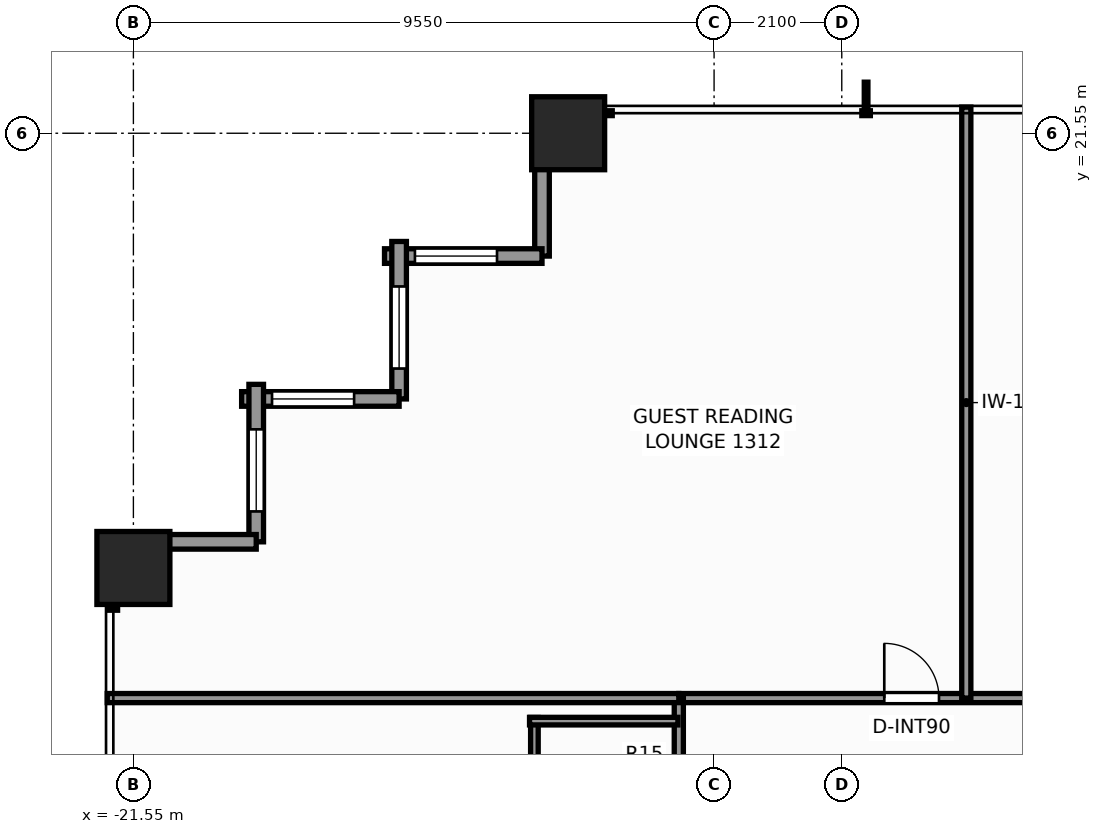
"""IFC4 building model, lengths in metres.
Left out: names, types, materials, properties, quantities, classifications, styles, units other than length and angle.
Written with IfcOpenShell. Run it as: python <this file> out.ifc"""

import sys

from ifc_helpers import new_model, si_unit, direction, frame, frame_2d, origin, origin_2d, place, context, subcontext, project, spatial, rectangle, extrude, element, fill, save


model = new_model("IFC4")
c1 = context("Model", 3, precision=1e-05, world=origin(), true_north=direction((0.0, 1.0)))
c2 = subcontext(c1, "Body", "Model", "MODEL_VIEW")
j1 = project(units=[si_unit("LENGTHUNIT", "METRE"), si_unit("PLANEANGLEUNIT", "RADIAN")], contexts=[c1])
p1 = place(None, origin())
s1 = spatial("IfcSite", under=j1, at=p1, CompositionType="ELEMENT")
p2 = place(p1, origin())
s2 = spatial("IfcBuilding", under=s1, at=p2, CompositionType="ELEMENT")
p3 = place(p2, frame((0.0, 0.0, 46.9)))
s3 = spatial("IfcBuildingStorey", under=s2, at=p3, CompositionType="ELEMENT", Elevation=46.9)
for number, where, z_axis, x_axis in (
    (1, (-14.4, 21.55, 0.0), (0.0, 0.0, 1.0), (1.0, 0.0, 0.0)),
    (2, (-21.55, 14.4, 0.0), (0.0, 0.0, 1.0), (1.0, 0.0, 0.0)),
):
    element("IfcColumn", number, at=place(p3, frame(where, z_axis=z_axis, x_axis=x_axis)), inside=s3, PredefinedType="COLUMN", context=c2, shape_type="SweptSolid", body=[
        extrude(rectangle(XDim=1.2, YDim=1.2, at=origin_2d()), origin(), (0.0, 0.0, 1.0), 3.3),
    ])
p4 = place(p3, frame((-14.83, 19.53, 0.0), z_axis=(0.0, 0.0, 1.0), x_axis=(0.0, 1.0, 0.0)))
e3 = element("IfcWall", 3, at=p4, inside=s3, PredefinedType="STANDARD", context=c2, shape_type="SweptSolid", body=[
    extrude(rectangle(XDim=2.59, YDim=0.24, at=frame_2d((1.295, 0.0))), origin(), (0.0, 0.0, 1.0), 2.439),
])
p5 = place(p3, frame((-17.42, 19.53, 0.0), z_axis=(0.0, 0.0, 1.0), x_axis=(1.0, 0.0, 0.0)))
e4 = element("IfcWall", 4, at=p5, inside=s3, PredefinedType="STANDARD", context=c2, shape_type="SweptSolid", body=[
    extrude(rectangle(XDim=2.59, YDim=0.24, at=frame_2d((1.295, 0.0))), origin(), (0.0, 0.0, 1.0), 2.439),
])
p6 = place(p5, frame((0.5, 0.0, 0.65)))
e5 = element("IfcOpeningElement", 5, at=p6, cuts=e4, PredefinedType="OPENING", context=c2, shape_type="SweptSolid", body=[
    extrude(rectangle(XDim=1.35, YDim=1.55, at=frame_2d((0.675, 0.775))), frame((0.0, 0.13, 0.0), z_axis=(0.0, -1.0, 0.0), x_axis=(1.0, 0.0, 0.0)), (0.0, 0.0, 1.0), 0.26),
])
p7 = place(p3, frame((-17.18, 17.18, 0.0), z_axis=(0.0, 0.0, 1.0), x_axis=(0.0, 1.0, 0.0)))
e6 = element("IfcWall", 6, at=p7, inside=s3, PredefinedType="STANDARD", context=c2, shape_type="SweptSolid", body=[
    extrude(rectangle(XDim=2.59, YDim=0.24, at=frame_2d((1.295, 0.0))), origin(), (0.0, 0.0, 1.0), 2.439),
])
p8 = place(p7, frame((0.5, 0.0, 0.65)))
e7 = element("IfcOpeningElement", 7, at=p8, cuts=e6, PredefinedType="OPENING", context=c2, shape_type="SweptSolid", body=[
    extrude(rectangle(XDim=1.35, YDim=1.55, at=frame_2d((0.675, 0.775))), frame((0.0, 0.13, 0.0), z_axis=(0.0, -1.0, 0.0), x_axis=(1.0, 0.0, 0.0)), (0.0, 0.0, 1.0), 0.26),
])
p9 = place(p3, frame((-19.77, 17.18, 0.0), z_axis=(0.0, 0.0, 1.0), x_axis=(1.0, 0.0, 0.0)))
e8 = element("IfcWall", 8, at=p9, inside=s3, PredefinedType="STANDARD", context=c2, shape_type="SweptSolid", body=[
    extrude(rectangle(XDim=2.59, YDim=0.24, at=frame_2d((1.295, 0.0))), origin(), (0.0, 0.0, 1.0), 2.439),
])
p10 = place(p9, frame((0.5, 0.0, 0.65)))
e9 = element("IfcOpeningElement", 9, at=p10, cuts=e8, PredefinedType="OPENING", context=c2, shape_type="SweptSolid", body=[
    extrude(rectangle(XDim=1.35, YDim=1.55, at=frame_2d((0.675, 0.775))), frame((0.0, 0.13, 0.0), z_axis=(0.0, -1.0, 0.0), x_axis=(1.0, 0.0, 0.0)), (0.0, 0.0, 1.0), 0.26),
])
p11 = place(p3, frame((-19.53, 14.83, 0.0), z_axis=(0.0, 0.0, 1.0), x_axis=(0.0, 1.0, 0.0)))
e10 = element("IfcWall", 10, at=p11, inside=s3, PredefinedType="STANDARD", context=c2, shape_type="SweptSolid", body=[
    extrude(rectangle(XDim=2.59, YDim=0.24, at=frame_2d((1.295, 0.0))), origin(), (0.0, 0.0, 1.0), 2.439),
])
p12 = place(p11, frame((0.5, 0.0, 0.65)))
e11 = element("IfcOpeningElement", 11, at=p12, cuts=e10, PredefinedType="OPENING", context=c2, shape_type="SweptSolid", body=[
    extrude(rectangle(XDim=1.35, YDim=1.55, at=frame_2d((0.675, 0.775))), frame((0.0, 0.13, 0.0), z_axis=(0.0, -1.0, 0.0), x_axis=(1.0, 0.0, 0.0)), (0.0, 0.0, 1.0), 0.26),
])
p13 = place(p3, frame((-22.12, 14.83, 0.0), z_axis=(0.0, 0.0, 1.0), x_axis=(1.0, 0.0, 0.0)))
e12 = element("IfcWall", 12, at=p13, inside=s3, PredefinedType="STANDARD", context=c2, shape_type="SweptSolid", body=[
    extrude(rectangle(XDim=2.59, YDim=0.24, at=frame_2d((1.295, 0.0))), origin(), (0.0, 0.0, 1.0), 2.439),
])
p14 = place(p3, frame((-12.58, 12.26, 0.0), z_axis=(0.0, 0.0, 1.0), x_axis=(1.0, 0.0, 0.0)))
e13 = element("IfcWall", 13, at=p14, inside=s3, PredefinedType="PARTITIONING", context=c2, shape_type="SweptSolid", body=[
    extrude(rectangle(XDim=25.0, YDim=0.15, at=frame_2d((12.5, 0.0))), origin(), (0.0, 0.0, 1.0), 2.272),
])
p15 = place(p14, frame((3.379, 0.0, 0.0)))
e14 = element("IfcOpeningElement", 14, at=p15, cuts=e13, PredefinedType="OPENING", context=c2, shape_type="SweptSolid", body=[
    extrude(rectangle(XDim=0.9, YDim=2.06, at=frame_2d((0.45, 1.03))), frame((0.0, 0.085, 0.0), z_axis=(0.0, -1.0, 0.0), x_axis=(1.0, 0.0, 0.0)), (0.0, 0.0, 1.0), 0.17),
])
p16 = place(p14, frame((10.1, 0.0, 0.0)))
e15 = element("IfcOpeningElement", 15, at=p16, cuts=e13, PredefinedType="OPENING", context=c2, shape_type="SweptSolid", body=[
    extrude(rectangle(XDim=0.9, YDim=2.06, at=frame_2d((0.45, 1.03))), frame((0.0, 0.085, 0.0), z_axis=(0.0, -1.0, 0.0), x_axis=(1.0, 0.0, 0.0)), (0.0, 0.0, 1.0), 0.17),
])
p17 = place(p14, frame((19.665, 0.0, 0.0)))
e16 = element("IfcOpeningElement", 16, at=p17, cuts=e13, PredefinedType="OPENING", context=c2, shape_type="SweptSolid", body=[
    extrude(rectangle(XDim=0.9, YDim=2.06, at=frame_2d((0.45, 1.03))), frame((0.0, 0.085, 0.0), z_axis=(0.0, -1.0, 0.0), x_axis=(1.0, 0.0, 0.0)), (0.0, 0.0, 1.0), 0.17),
])
p18 = place(p3, frame((-12.58, -12.58, 0.0), z_axis=(0.0, 0.0, 1.0), x_axis=(0.0, 1.0, 0.0)))
e17 = element("IfcWall", 17, at=p18, inside=s3, PredefinedType="PARTITIONING", context=c2, shape_type="SweptSolid", body=[
    extrude(rectangle(XDim=24.84, YDim=0.15, at=frame_2d((12.42, 0.0))), origin(), (0.0, 0.0, 1.0), 2.272),
])
p19 = place(p18, frame((3.856, 0.0, 0.0)))
e18 = element("IfcOpeningElement", 18, at=p19, cuts=e17, PredefinedType="OPENING", context=c2, shape_type="SweptSolid", body=[
    extrude(rectangle(XDim=0.95, YDim=2.06, at=frame_2d((0.475, 1.03))), frame((0.0, 0.085, 0.0), z_axis=(0.0, -1.0, 0.0), x_axis=(1.0, 0.0, 0.0)), (0.0, 0.0, 1.0), 0.17),
])
p20 = place(p18, frame((9.119, 0.0, 0.0)))
e19 = element("IfcOpeningElement", 19, at=p20, cuts=e17, PredefinedType="OPENING", context=c2, shape_type="SweptSolid", body=[
    extrude(rectangle(XDim=0.95, YDim=2.06, at=frame_2d((0.475, 1.03))), frame((0.0, 0.085, 0.0), z_axis=(0.0, -1.0, 0.0), x_axis=(1.0, 0.0, 0.0)), (0.0, 0.0, 1.0), 0.17),
])
p21 = place(p18, frame((14.428, 0.0, 0.0)))
e20 = element("IfcOpeningElement", 20, at=p21, cuts=e17, PredefinedType="OPENING", context=c2, shape_type="SweptSolid", body=[
    extrude(rectangle(XDim=0.95, YDim=2.06, at=frame_2d((0.475, 1.03))), frame((0.0, 0.085, 0.0), z_axis=(0.0, -1.0, 0.0), x_axis=(1.0, 0.0, 0.0)), (0.0, 0.0, 1.0), 0.17),
])
p22 = place(p18, frame((20.309, 0.0, 0.0)))
e21 = element("IfcOpeningElement", 21, at=p22, cuts=e17, PredefinedType="OPENING", context=c2, shape_type="SweptSolid", body=[
    extrude(rectangle(XDim=0.95, YDim=2.06, at=frame_2d((0.475, 1.03))), frame((0.0, 0.085, 0.0), z_axis=(0.0, -1.0, 0.0), x_axis=(1.0, 0.0, 0.0)), (0.0, 0.0, 1.0), 0.17),
])
p23 = place(p3, frame((-21.98, 12.26, 0.0), z_axis=(0.0, 0.0, 1.0), x_axis=(1.0, 0.0, 0.0)))
e22 = element("IfcWall", 22, at=p23, inside=s3, PredefinedType="PARTITIONING", context=c2, shape_type="SweptSolid", body=[
    extrude(rectangle(XDim=9.4, YDim=0.15, at=frame_2d((4.7, 0.0))), origin(), (0.0, 0.0, 1.0), 2.272),
])
p24 = place(p3, frame((-14.955, 9.671, 0.0), z_axis=(0.0, 0.0, 1.0), x_axis=(0.0, 1.0, 0.0)))
e23 = element("IfcWall", 23, at=p24, inside=s3, PredefinedType="PARTITIONING", context=c2, shape_type="SweptSolid", body=[
    extrude(rectangle(XDim=2.27, YDim=0.125, at=frame_2d((1.135, 0.0))), origin(), (0.0, 0.0, 1.0), 2.272),
])
p25 = place(p3, frame((-15.035, 11.881, 0.0), z_axis=(0.0, 0.0, 1.0), x_axis=(1.0, 0.0, 0.0)))
e24 = element("IfcWall", 24, at=p25, inside=s3, PredefinedType="PARTITIONING", context=c2, shape_type="SweptSolid", body=[
    extrude(rectangle(XDim=2.44, YDim=0.125, at=frame_2d((1.22, 0.0))), origin(), (0.0, 0.0, 1.0), 2.272),
])
p26 = place(p3, frame((-7.852, 12.26, 0.0), z_axis=(0.0, 0.0, 1.0), x_axis=(0.0, 1.0, 0.0)))
e25 = element("IfcWall", 25, at=p26, inside=s3, PredefinedType="PARTITIONING", context=c2, shape_type="SweptSolid", body=[
    extrude(rectangle(XDim=9.72, YDim=0.15, at=frame_2d((4.86, 0.0))), origin(), (0.0, 0.0, 1.0), 2.429),
])
p27 = place(p6, origin())
e26 = element("IfcWindow", 26, at=p27, inside=s3, PartitioningType="SINGLE_PANEL", PredefinedType="WINDOW", context=c2, shape_type="SweptSolid", body=[
    extrude(rectangle(XDim=1.35, YDim=1.55, at=frame_2d((0.675, 0.775))), frame((0.0, 0.03, 0.0), z_axis=(0.0, -1.0, 0.0), x_axis=(1.0, 0.0, 0.0)), (0.0, 0.0, 1.0), 0.06),
])
fill(e5, e26)
p28 = place(p8, origin())
e27 = element("IfcWindow", 27, at=p28, inside=s3, PartitioningType="SINGLE_PANEL", PredefinedType="WINDOW", context=c2, shape_type="SweptSolid", body=[
    extrude(rectangle(XDim=1.35, YDim=1.55, at=frame_2d((0.675, 0.775))), frame((0.0, 0.03, 0.0), z_axis=(0.0, -1.0, 0.0), x_axis=(1.0, 0.0, 0.0)), (0.0, 0.0, 1.0), 0.06),
])
fill(e7, e27)
p29 = place(p10, origin())
e28 = element("IfcWindow", 28, at=p29, inside=s3, PartitioningType="SINGLE_PANEL", PredefinedType="WINDOW", context=c2, shape_type="SweptSolid", body=[
    extrude(rectangle(XDim=1.35, YDim=1.55, at=frame_2d((0.675, 0.775))), frame((0.0, 0.03, 0.0), z_axis=(0.0, -1.0, 0.0), x_axis=(1.0, 0.0, 0.0)), (0.0, 0.0, 1.0), 0.06),
])
fill(e9, e28)
p30 = place(p12, origin())
e29 = element("IfcWindow", 29, at=p30, inside=s3, PartitioningType="SINGLE_PANEL", PredefinedType="WINDOW", context=c2, shape_type="SweptSolid", body=[
    extrude(rectangle(XDim=1.35, YDim=1.55, at=frame_2d((0.675, 0.775))), frame((0.0, 0.03, 0.0), z_axis=(0.0, -1.0, 0.0), x_axis=(1.0, 0.0, 0.0)), (0.0, 0.0, 1.0), 0.06),
])
fill(e11, e29)
p31 = place(p15, origin())
e30 = element("IfcDoor", 30, at=p31, inside=s3, OperationType="SINGLE_SWING_LEFT", PredefinedType="DOOR", context=c2, shape_type="SweptSolid", body=[
    extrude(rectangle(XDim=0.9, YDim=2.06, at=frame_2d((0.45, 1.03))), frame((0.0, 0.025, 0.0), z_axis=(0.0, -1.0, 0.0), x_axis=(1.0, 0.0, 0.0)), (0.0, 0.0, 1.0), 0.05),
])
fill(e14, e30)
save(model, sys.argv[1])
